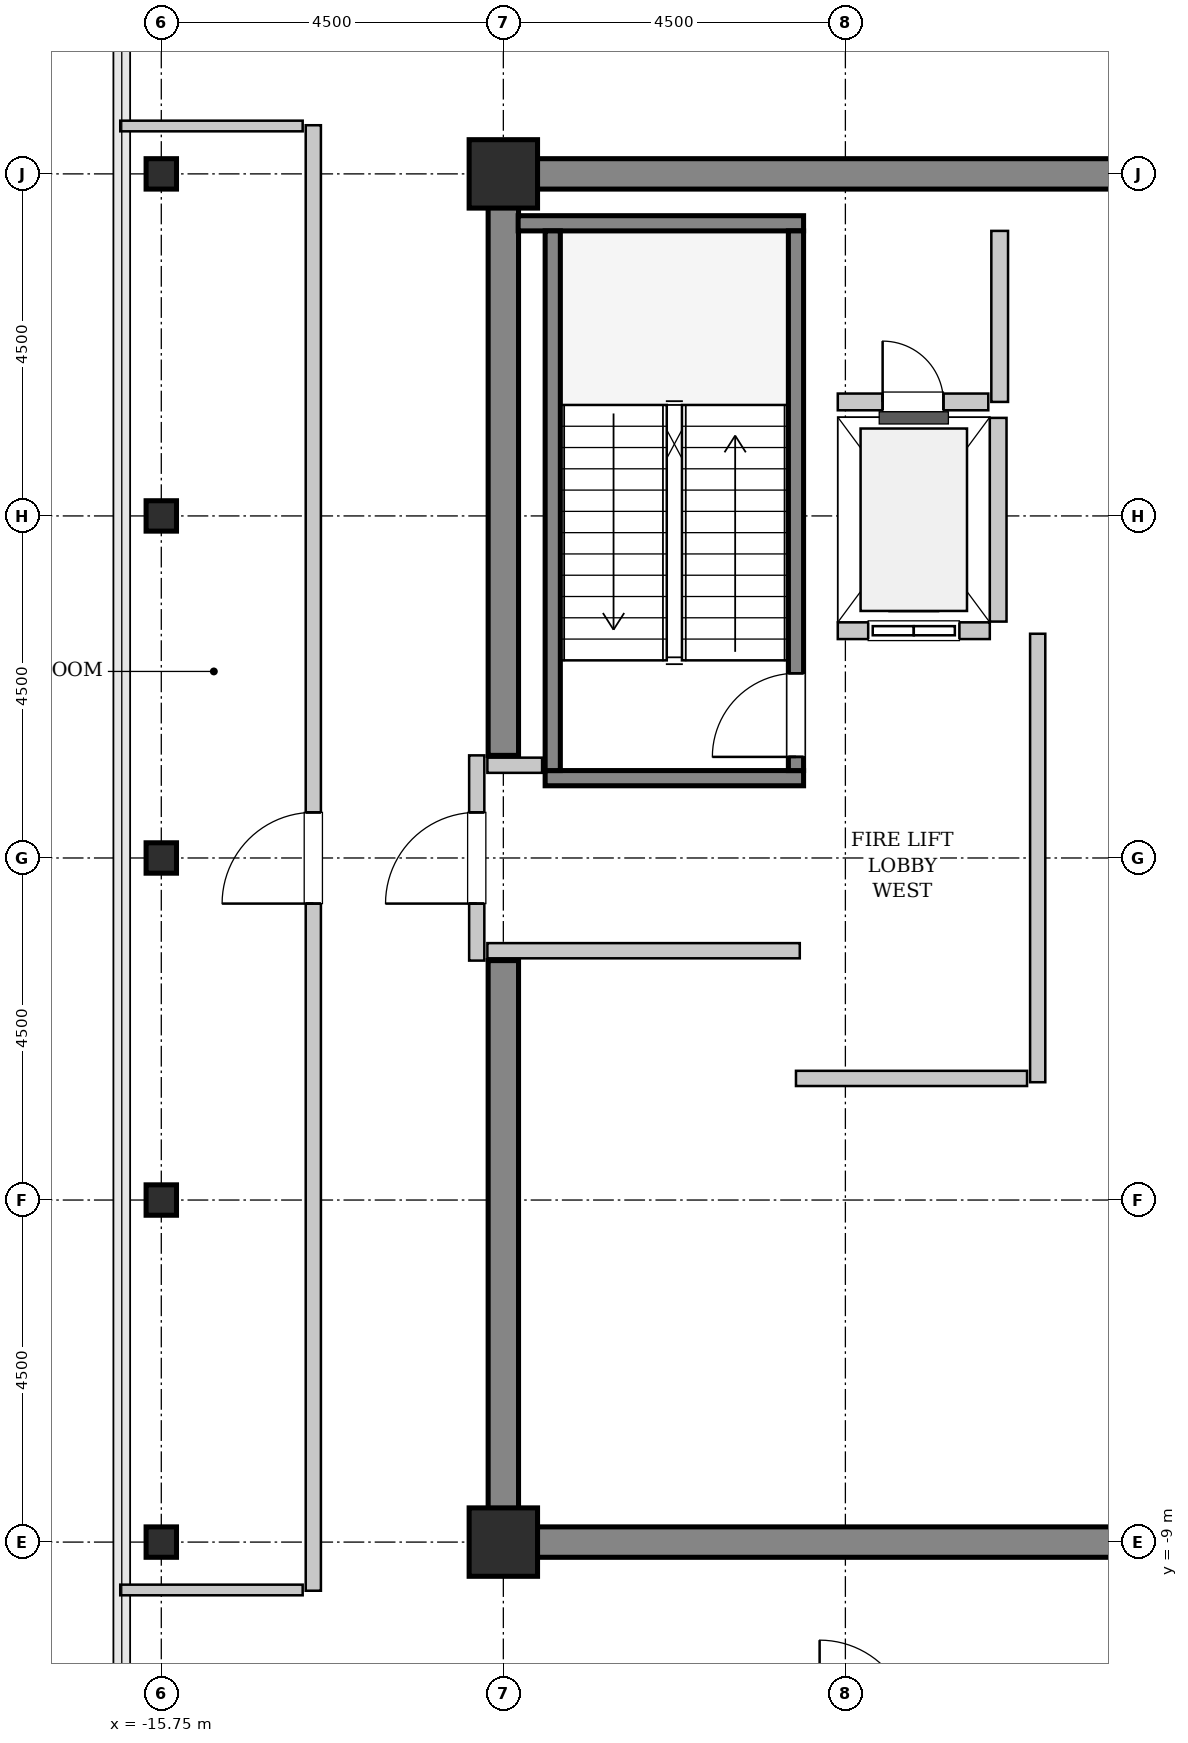
"""IFC4 building model, lengths in metres.
Left out: names, types, materials, properties, quantities, classifications, styles, units other than length and angle.
Written with IfcOpenShell. Run it as: python <this file> out.ifc"""

import sys

from ifc_helpers import new_model, si_unit, direction, frame, frame_2d, origin, origin_2d, place, context, subcontext, project, spatial, rectangle, hollow_rectangle, extrude, source, transform, mapped, element, fill, save


model = new_model("IFC4")
c1 = context("Model", 3, precision=1e-05, world=origin(), true_north=direction((0.0, 1.0)))
c2 = subcontext(c1, "Body", "Model", "MODEL_VIEW")
j1 = project(units=[si_unit("LENGTHUNIT", "METRE"), si_unit("PLANEANGLEUNIT", "RADIAN")], contexts=[c1])
p1 = place(None, origin())
s1 = spatial("IfcSite", under=j1, at=p1, CompositionType="ELEMENT")
p2 = place(p1, origin())
s2 = spatial("IfcBuilding", under=s1, at=p2, CompositionType="ELEMENT")
p3 = place(p2, frame((0.0, 0.0, 363.0)))
s3 = spatial("IfcBuildingStorey", under=s2, at=p3, CompositionType="ELEMENT", Elevation=363.0)
m1 = source(origin(), c2, "Body", "SweptSolid", [
    extrude(rectangle(XDim=9.9, YDim=0.4, at=frame_2d((4.95, 0.0))), origin(), (0.0, 0.0, 1.0), 4.4),
])
for number, where, z_axis, x_axis in (
    (1, (-11.45, 9.0, 0.0), (0.0, 0.0, 1.0), (1.0, 0.0, 0.0)),
    (2, (-11.45, -9.0, 0.0), (0.0, 0.0, 1.0), (1.0, 0.0, 0.0)),
):
    element("IfcWall", number, at=place(p3, frame(where, z_axis=z_axis, x_axis=x_axis)), inside=s3, PredefinedType="SHEAR", context=c2, shape_type="MappedRepresentation", body=[
        mapped(m1, transform((0.0, 0.0, 0.0), x_axis=(1.0, 0.0, 0.0), y_axis=(0.0, 1.0, 0.0), z_axis=(0.0, 0.0, 1.0), scale=1.0)),
    ])
m2 = source(origin(), c2, "Body", "SweptSolid", [
    extrude(rectangle(XDim=7.45, YDim=0.4, at=frame_2d((3.725, 0.0))), origin(), (0.0, 0.0, 1.0), 4.4),
])
for number, where, z_axis, x_axis in (
    (3, (-11.25, -8.8, 0.0), (0.0, 0.0, 1.0), (0.0, 1.0, 0.0)),
    (4, (-11.25, 1.35, 0.0), (0.0, 0.0, 1.0), (0.0, 1.0, 0.0)),
):
    element("IfcWall", number, at=place(p3, frame(where, z_axis=z_axis, x_axis=x_axis)), inside=s3, PredefinedType="SHEAR", context=c2, shape_type="MappedRepresentation", body=[
        mapped(m2, transform((0.0, 0.0, 0.0), x_axis=(1.0, 0.0, 0.0), y_axis=(0.0, 1.0, 0.0), z_axis=(0.0, 0.0, 1.0), scale=1.0)),
    ])
m3 = source(origin(), c2, "Body", "SweptSolid", [
    extrude(hollow_rectangle(XDim=0.4, YDim=0.4, WallThickness=0.02, InnerFilletRadius=0.02, OuterFilletRadius=0.04, at=origin_2d()), origin(), (0.0, 0.0, 1.0), 4.4),
])
for number, where, z_axis, x_axis in (
    (5, (-15.75, -9.0, 0.0), (0.0, 0.0, 1.0), (1.0, 0.0, 0.0)),
    (6, (-15.75, -4.5, 0.0), (0.0, 0.0, 1.0), (1.0, 0.0, 0.0)),
    (7, (-15.75, 0.0, 0.0), (0.0, 0.0, 1.0), (1.0, 0.0, 0.0)),
    (8, (-15.75, 4.5, 0.0), (0.0, 0.0, 1.0), (1.0, 0.0, 0.0)),
    (9, (-15.75, 9.0, 0.0), (0.0, 0.0, 1.0), (1.0, 0.0, 0.0)),
):
    element("IfcColumn", number, at=place(p3, frame(where, z_axis=z_axis, x_axis=x_axis)), inside=s3, PredefinedType="COLUMN", context=c2, shape_type="MappedRepresentation", body=[
        mapped(m3, transform((0.0, 0.0, 0.0), x_axis=(1.0, 0.0, 0.0), y_axis=(0.0, 1.0, 0.0), z_axis=(0.0, 0.0, 1.0), scale=1.0)),
    ])
m4 = source(origin(), c2, "Body", "SweptSolid", [
    extrude(rectangle(XDim=0.9, YDim=0.9, at=origin_2d()), origin(), (0.0, 0.0, 1.0), 4.4),
])
for number, where, z_axis, x_axis in (
    (10, (-11.25, -9.0, 0.0), (0.0, 0.0, 1.0), (1.0, 0.0, 0.0)),
    (11, (-11.25, 9.0, 0.0), (0.0, 0.0, 1.0), (1.0, 0.0, 0.0)),
):
    element("IfcColumn", number, at=place(p3, frame(where, z_axis=z_axis, x_axis=x_axis)), inside=s3, PredefinedType="COLUMN", context=c2, shape_type="MappedRepresentation", body=[
        mapped(m4, transform((0.0, 0.0, 0.0), x_axis=(1.0, 0.0, 0.0), y_axis=(0.0, 1.0, 0.0), z_axis=(0.0, 0.0, 1.0), scale=1.0)),
    ])
m5 = source(origin(), c2, "Body", "SweptSolid", [
    extrude(rectangle(XDim=3.4, YDim=0.2, at=frame_2d((1.7, 0.0))), origin(), (0.0, 0.0, 1.0), 4.4),
])
p4 = place(p3, frame((-7.3, 1.05, 0.0), z_axis=(0.0, 0.0, 1.0), x_axis=(-1.0, 0.0, 0.0)))
e12 = element("IfcWall", 12, at=p4, inside=s3, PredefinedType="SOLIDWALL", context=c2, shape_type="MappedRepresentation", body=[
    mapped(m5, transform((0.0, 0.0, 0.0), x_axis=(1.0, 0.0, 0.0), y_axis=(0.0, 1.0, 0.0), z_axis=(0.0, 0.0, 1.0), scale=1.0)),
])
m6 = source(origin(), c2, "Body", "SweptSolid", [
    extrude(rectangle(XDim=3.755, YDim=0.2, at=frame_2d((1.877, 0.0))), origin(), (0.0, 0.0, 1.0), 4.4),
])
p5 = place(p3, frame((-7.3, 8.35, 0.0), z_axis=(0.0, 0.0, 1.0), x_axis=(-1.0, 0.0, 0.0)))
e13 = element("IfcWall", 13, at=p5, inside=s3, PredefinedType="SOLIDWALL", context=c2, shape_type="MappedRepresentation", body=[
    mapped(m6, transform((0.0, 0.0, 0.0), x_axis=(1.0, 0.0, 0.0), y_axis=(0.0, 1.0, 0.0), z_axis=(0.0, 0.0, 1.0), scale=1.0)),
])
m7 = source(origin(), c2, "Body", "SweptSolid", [
    extrude(rectangle(XDim=7.1, YDim=0.2, at=frame_2d((3.55, 0.0))), origin(), (0.0, 0.0, 1.0), 4.4),
])
p6 = place(p3, frame((-7.4, 1.15, 0.0), z_axis=(0.0, 0.0, 1.0), x_axis=(0.0, 1.0, 0.0)))
e14 = element("IfcWall", 14, at=p6, inside=s3, PredefinedType="SOLIDWALL", context=c2, shape_type="MappedRepresentation", body=[
    mapped(m7, transform((0.0, 0.0, 0.0), x_axis=(1.0, 0.0, 0.0), y_axis=(0.0, 1.0, 0.0), z_axis=(0.0, 0.0, 1.0), scale=1.0)),
])
p7 = place(p6, frame((0.18, 0.0, 0.0)))
e15 = element("IfcOpeningElement", 15, at=p7, cuts=e14, PredefinedType="OPENING", context=c2, shape_type="SweptSolid", body=[
    extrude(rectangle(XDim=1.1, YDim=2.15, at=frame_2d((0.55, 1.075))), frame((0.0, 0.11, 0.0), z_axis=(0.0, -1.0, 0.0), x_axis=(1.0, 0.0, 0.0)), (0.0, 0.0, 1.0), 0.22),
])
p8 = place(p3, frame((-10.6, 1.15, 0.0), z_axis=(0.0, 0.0, 1.0), x_axis=(0.0, 1.0, 0.0)))
e16 = element("IfcWall", 16, at=p8, inside=s3, PredefinedType="SOLIDWALL", context=c2, shape_type="MappedRepresentation", body=[
    mapped(m7, transform((0.0, 0.0, 0.0), x_axis=(1.0, 0.0, 0.0), y_axis=(0.0, 1.0, 0.0), z_axis=(0.0, 0.0, 1.0), scale=1.0)),
])
m8 = source(origin(), c2, "Body", "SweptSolid", [
    extrude(rectangle(XDim=2.0, YDim=0.22, at=frame_2d((1.0, 0.0))), origin(), (0.0, 0.0, 1.0), 4.085),
])
p9 = place(p3, frame((-6.85, 2.99, 0.0), z_axis=(0.0, 0.0, 1.0), x_axis=(1.0, 0.0, 0.0)))
e17 = element("IfcWall", 17, at=p9, inside=s3, PredefinedType="SOLIDWALL", context=c2, shape_type="MappedRepresentation", body=[
    mapped(m8, transform((0.0, 0.0, 0.0), x_axis=(1.0, 0.0, 0.0), y_axis=(0.0, 1.0, 0.0), z_axis=(0.0, 0.0, 1.0), scale=1.0)),
])
p10 = place(p9, frame((0.4, 0.0, 0.0)))
e18 = element("IfcOpeningElement", 18, at=p10, cuts=e17, PredefinedType="OPENING", context=c2, shape_type="SweptSolid", body=[
    extrude(rectangle(XDim=1.2, YDim=2.2, at=frame_2d((0.6, 1.1))), frame((0.0, 0.12, 0.0), z_axis=(0.0, -1.0, 0.0), x_axis=(1.0, 0.0, 0.0)), (0.0, 0.0, 1.0), 0.24),
])
m9 = source(origin(), c2, "Body", "SweptSolid", [
    extrude(rectangle(XDim=2.68, YDim=0.22, at=frame_2d((1.34, 0.0))), origin(), (0.0, 0.0, 1.0), 4.085),
])
p11 = place(p3, frame((-4.74, 3.11, 0.0), z_axis=(0.0, 0.0, 1.0), x_axis=(0.0, 1.0, 0.0)))
e19 = element("IfcWall", 19, at=p11, inside=s3, PredefinedType="SOLIDWALL", context=c2, shape_type="MappedRepresentation", body=[
    mapped(m9, transform((0.0, 0.0, 0.0), x_axis=(1.0, 0.0, 0.0), y_axis=(0.0, 1.0, 0.0), z_axis=(0.0, 0.0, 1.0), scale=1.0)),
])
m10 = source(origin(), c2, "Body", "SweptSolid", [
    extrude(rectangle(XDim=2.25, YDim=0.22, at=frame_2d((1.125, 0.0))), origin(), (0.0, 0.0, 1.0), 4.085),
])
p12 = place(p3, frame((-4.72, 6.0, 0.0), z_axis=(0.0, 0.0, 1.0), x_axis=(0.0, 1.0, 0.0)))
e20 = element("IfcWall", 20, at=p12, inside=s3, PredefinedType="SOLIDWALL", context=c2, shape_type="MappedRepresentation", body=[
    mapped(m10, transform((0.0, 0.0, 0.0), x_axis=(1.0, 0.0, 0.0), y_axis=(0.0, 1.0, 0.0), z_axis=(0.0, 0.0, 1.0), scale=1.0)),
])
m11 = source(origin(), c2, "Body", "SweptSolid", [
    extrude(rectangle(XDim=1.98, YDim=0.22, at=frame_2d((0.99, 0.0))), origin(), (0.0, 0.0, 1.0), 4.085),
])
p13 = place(p3, frame((-6.85, 6.0, 0.0), z_axis=(0.0, 0.0, 1.0), x_axis=(1.0, 0.0, 0.0)))
e21 = element("IfcWall", 21, at=p13, inside=s3, PredefinedType="SOLIDWALL", context=c2, shape_type="MappedRepresentation", body=[
    mapped(m11, transform((0.0, 0.0, 0.0), x_axis=(1.0, 0.0, 0.0), y_axis=(0.0, 1.0, 0.0), z_axis=(0.0, 0.0, 1.0), scale=1.0)),
])
p14 = place(p13, frame((0.59, 0.0, 0.0)))
e22 = element("IfcOpeningElement", 22, at=p14, cuts=e21, PredefinedType="OPENING", context=c2, shape_type="SweptSolid", body=[
    extrude(rectangle(XDim=0.8, YDim=2.0, at=frame_2d((0.4, 1.0))), frame((0.0, 0.12, 0.0), z_axis=(0.0, -1.0, 0.0), x_axis=(1.0, 0.0, 0.0)), (0.0, 0.0, 1.0), 0.24),
])
m12 = source(origin(), c2, "Body", "SweptSolid", [
    extrude(rectangle(XDim=2.7, YDim=0.2, at=frame_2d((1.35, 0.0))), origin(), (0.0, 0.0, 1.0), 3.175),
])
p15 = place(p3, frame((-11.6, -1.35, 0.0), z_axis=(0.0, 0.0, 1.0), x_axis=(0.0, 1.0, 0.0)))
e23 = element("IfcWall", 23, at=p15, inside=s3, PredefinedType="PARTITIONING", context=c2, shape_type="MappedRepresentation", body=[
    mapped(m12, transform((0.0, 0.0, 0.0), x_axis=(1.0, 0.0, 0.0), y_axis=(0.0, 1.0, 0.0), z_axis=(0.0, 0.0, 1.0), scale=1.0)),
])
p16 = place(p15, frame((0.75, 0.0, 0.0)))
e24 = element("IfcOpeningElement", 24, at=p16, cuts=e23, PredefinedType="OPENING", context=c2, shape_type="SweptSolid", body=[
    extrude(rectangle(XDim=1.2, YDim=2.15, at=frame_2d((0.6, 1.075))), frame((0.0, 0.11, 0.0), z_axis=(0.0, -1.0, 0.0), x_axis=(1.0, 0.0, 0.0)), (0.0, 0.0, 1.0), 0.22),
])
m13 = source(origin(), c2, "Body", "SweptSolid", [
    extrude(rectangle(XDim=5.9, YDim=0.2, at=frame_2d((2.95, 0.0))), origin(), (0.0, 0.0, 1.0), 4.085),
])
p17 = place(p3, frame((-4.22, -2.95, 0.0), z_axis=(0.0, 0.0, 1.0), x_axis=(0.0, 1.0, 0.0)))
e25 = element("IfcWall", 25, at=p17, inside=s3, PredefinedType="PARTITIONING", context=c2, shape_type="MappedRepresentation", body=[
    mapped(m13, transform((0.0, 0.0, 0.0), x_axis=(1.0, 0.0, 0.0), y_axis=(0.0, 1.0, 0.0), z_axis=(0.0, 0.0, 1.0), scale=1.0)),
])
m14 = source(origin(), c2, "Body", "SweptSolid", [
    extrude(rectangle(XDim=3.04, YDim=0.2, at=frame_2d((1.52, 0.0))), origin(), (0.0, 0.0, 1.0), 4.085),
])
p18 = place(p3, frame((-7.4, -2.9, 0.0), z_axis=(0.0, 0.0, 1.0), x_axis=(1.0, 0.0, 0.0)))
e26 = element("IfcWall", 26, at=p18, inside=s3, PredefinedType="PARTITIONING", context=c2, shape_type="MappedRepresentation", body=[
    mapped(m14, transform((0.0, 0.0, 0.0), x_axis=(1.0, 0.0, 0.0), y_axis=(0.0, 1.0, 0.0), z_axis=(0.0, 0.0, 1.0), scale=1.0)),
])
m15 = source(origin(), c2, "Body", "SweptSolid", [
    extrude(rectangle(XDim=0.72, YDim=0.2, at=frame_2d((0.36, 0.0))), origin(), (0.0, 0.0, 1.0), 4.085),
])
p19 = place(p3, frame((-11.46, 1.22, 0.0), z_axis=(0.0, 0.0, 1.0), x_axis=(1.0, 0.0, 0.0)))
e27 = element("IfcWall", 27, at=p19, inside=s3, PredefinedType="PARTITIONING", context=c2, shape_type="MappedRepresentation", body=[
    mapped(m15, transform((0.0, 0.0, 0.0), x_axis=(1.0, 0.0, 0.0), y_axis=(0.0, 1.0, 0.0), z_axis=(0.0, 0.0, 1.0), scale=1.0)),
])
m16 = source(origin(), c2, "Body", "SweptSolid", [
    extrude(rectangle(XDim=4.11, YDim=0.2, at=frame_2d((2.055, 0.0))), origin(), (0.0, 0.0, 1.0), 4.085),
])
p20 = place(p3, frame((-11.46, -1.22, 0.0), z_axis=(0.0, 0.0, 1.0), x_axis=(1.0, 0.0, 0.0)))
e28 = element("IfcWall", 28, at=p20, inside=s3, PredefinedType="PARTITIONING", context=c2, shape_type="MappedRepresentation", body=[
    mapped(m16, transform((0.0, 0.0, 0.0), x_axis=(1.0, 0.0, 0.0), y_axis=(0.0, 1.0, 0.0), z_axis=(0.0, 0.0, 1.0), scale=1.0)),
])
m17 = source(origin(), c2, "Body", "SweptSolid", [
    extrude(rectangle(XDim=19.28, YDim=0.2, at=frame_2d((9.64, 0.0))), origin(), (0.0, 0.0, 1.0), 4.085),
])
p21 = place(p3, frame((-13.75, -9.64, 0.0), z_axis=(0.0, 0.0, 1.0), x_axis=(0.0, 1.0, 0.0)))
e29 = element("IfcWall", 29, at=p21, inside=s3, PredefinedType="SOLIDWALL", context=c2, shape_type="MappedRepresentation", body=[
    mapped(m17, transform((0.0, 0.0, 0.0), x_axis=(1.0, 0.0, 0.0), y_axis=(0.0, 1.0, 0.0), z_axis=(0.0, 0.0, 1.0), scale=1.0)),
])
p22 = place(p21, frame((9.04, 0.0, 0.0)))
e30 = element("IfcOpeningElement", 30, at=p22, cuts=e29, PredefinedType="OPENING", context=c2, shape_type="SweptSolid", body=[
    extrude(rectangle(XDim=1.2, YDim=2.15, at=frame_2d((0.6, 1.075))), frame((0.0, 0.11, 0.0), z_axis=(0.0, -1.0, 0.0), x_axis=(1.0, 0.0, 0.0)), (0.0, 0.0, 1.0), 0.22),
])
m18 = source(origin(), c2, "Body", "SweptSolid", [
    extrude(rectangle(XDim=2.4, YDim=0.14, at=frame_2d((1.2, 0.0))), origin(), (0.0, 0.0, 1.0), 4.085),
])
for number, where, z_axis, x_axis in (
    (31, (-16.29, -9.63, 0.0), (0.0, 0.0, 1.0), (1.0, 0.0, 0.0)),
    (32, (-16.29, 9.63, 0.0), (0.0, 0.0, 1.0), (1.0, 0.0, 0.0)),
):
    element("IfcWall", number, at=place(p3, frame(where, z_axis=z_axis, x_axis=x_axis)), inside=s3, PredefinedType="PARTITIONING", context=c2, shape_type="MappedRepresentation", body=[
        mapped(m18, transform((0.0, 0.0, 0.0), x_axis=(1.0, 0.0, 0.0), y_axis=(0.0, 1.0, 0.0), z_axis=(0.0, 0.0, 1.0), scale=1.0)),
    ])
m19 = source(origin(), c2, "Body", "SweptSolid", [
    extrude(rectangle(XDim=1.1, YDim=2.15, at=frame_2d((0.55, 1.075))), frame((0.0, 0.025, 0.0), z_axis=(0.0, -1.0, 0.0), x_axis=(1.0, 0.0, 0.0)), (0.0, 0.0, 1.0), 0.05),
])
p23 = place(p7, origin())
e33 = element("IfcDoor", 33, at=p23, inside=s3, OperationType="SINGLE_SWING_LEFT", PredefinedType="DOOR", context=c2, shape_type="MappedRepresentation", body=[
    mapped(m19, transform((0.0, 0.0, 0.0), x_axis=(1.0, 0.0, 0.0), y_axis=(0.0, 1.0, 0.0), z_axis=(0.0, 0.0, 1.0), scale=1.0)),
])
fill(e15, e33)
m20 = source(origin(), c2, "Body", "SweptSolid", [
    extrude(rectangle(XDim=1.2, YDim=2.2, at=frame_2d((0.6, 1.1))), frame((0.0, 0.025, 0.0), z_axis=(0.0, -1.0, 0.0), x_axis=(1.0, 0.0, 0.0)), (0.0, 0.0, 1.0), 0.05),
])
p24 = place(p10, origin())
e34 = element("IfcDoor", 34, at=p24, inside=s3, OperationType="SLIDING_TO_LEFT", PredefinedType="DOOR", context=c2, shape_type="MappedRepresentation", body=[
    mapped(m20, transform((0.0, 0.0, 0.0), x_axis=(1.0, 0.0, 0.0), y_axis=(0.0, 1.0, 0.0), z_axis=(0.0, 0.0, 1.0), scale=1.0)),
])
fill(e18, e34)
m21 = source(origin(), c2, "Body", "SweptSolid", [
    extrude(rectangle(XDim=0.8, YDim=2.0, at=frame_2d((0.4, 1.0))), frame((0.0, 0.025, 0.0), z_axis=(0.0, -1.0, 0.0), x_axis=(1.0, 0.0, 0.0)), (0.0, 0.0, 1.0), 0.05),
])
p25 = place(p14, origin())
e35 = element("IfcDoor", 35, at=p25, inside=s3, OperationType="SINGLE_SWING_LEFT", PredefinedType="TRAPDOOR", context=c2, shape_type="MappedRepresentation", body=[
    mapped(m21, transform((0.0, 0.0, 0.0), x_axis=(1.0, 0.0, 0.0), y_axis=(0.0, 1.0, 0.0), z_axis=(0.0, 0.0, 1.0), scale=1.0)),
])
fill(e22, e35)
m22 = source(origin(), c2, "Body", "SweptSolid", [
    extrude(rectangle(XDim=1.2, YDim=2.15, at=frame_2d((0.6, 1.075))), frame((0.0, 0.025, 0.0), z_axis=(0.0, -1.0, 0.0), x_axis=(1.0, 0.0, 0.0)), (0.0, 0.0, 1.0), 0.05),
])
p26 = place(p16, origin())
e36 = element("IfcDoor", 36, at=p26, inside=s3, OperationType="SINGLE_SWING_LEFT", PredefinedType="DOOR", context=c2, shape_type="MappedRepresentation", body=[
    mapped(m22, transform((0.0, 0.0, 0.0), x_axis=(1.0, 0.0, 0.0), y_axis=(0.0, 1.0, 0.0), z_axis=(0.0, 0.0, 1.0), scale=1.0)),
])
fill(e24, e36)
p27 = place(p22, origin())
e37 = element("IfcDoor", 37, at=p27, inside=s3, OperationType="SINGLE_SWING_LEFT", PredefinedType="DOOR", context=c2, shape_type="MappedRepresentation", body=[
    mapped(m22, transform((0.0, 0.0, 0.0), x_axis=(1.0, 0.0, 0.0), y_axis=(0.0, 1.0, 0.0), z_axis=(0.0, 0.0, 1.0), scale=1.0)),
])
fill(e30, e37)
save(model, sys.argv[1])
